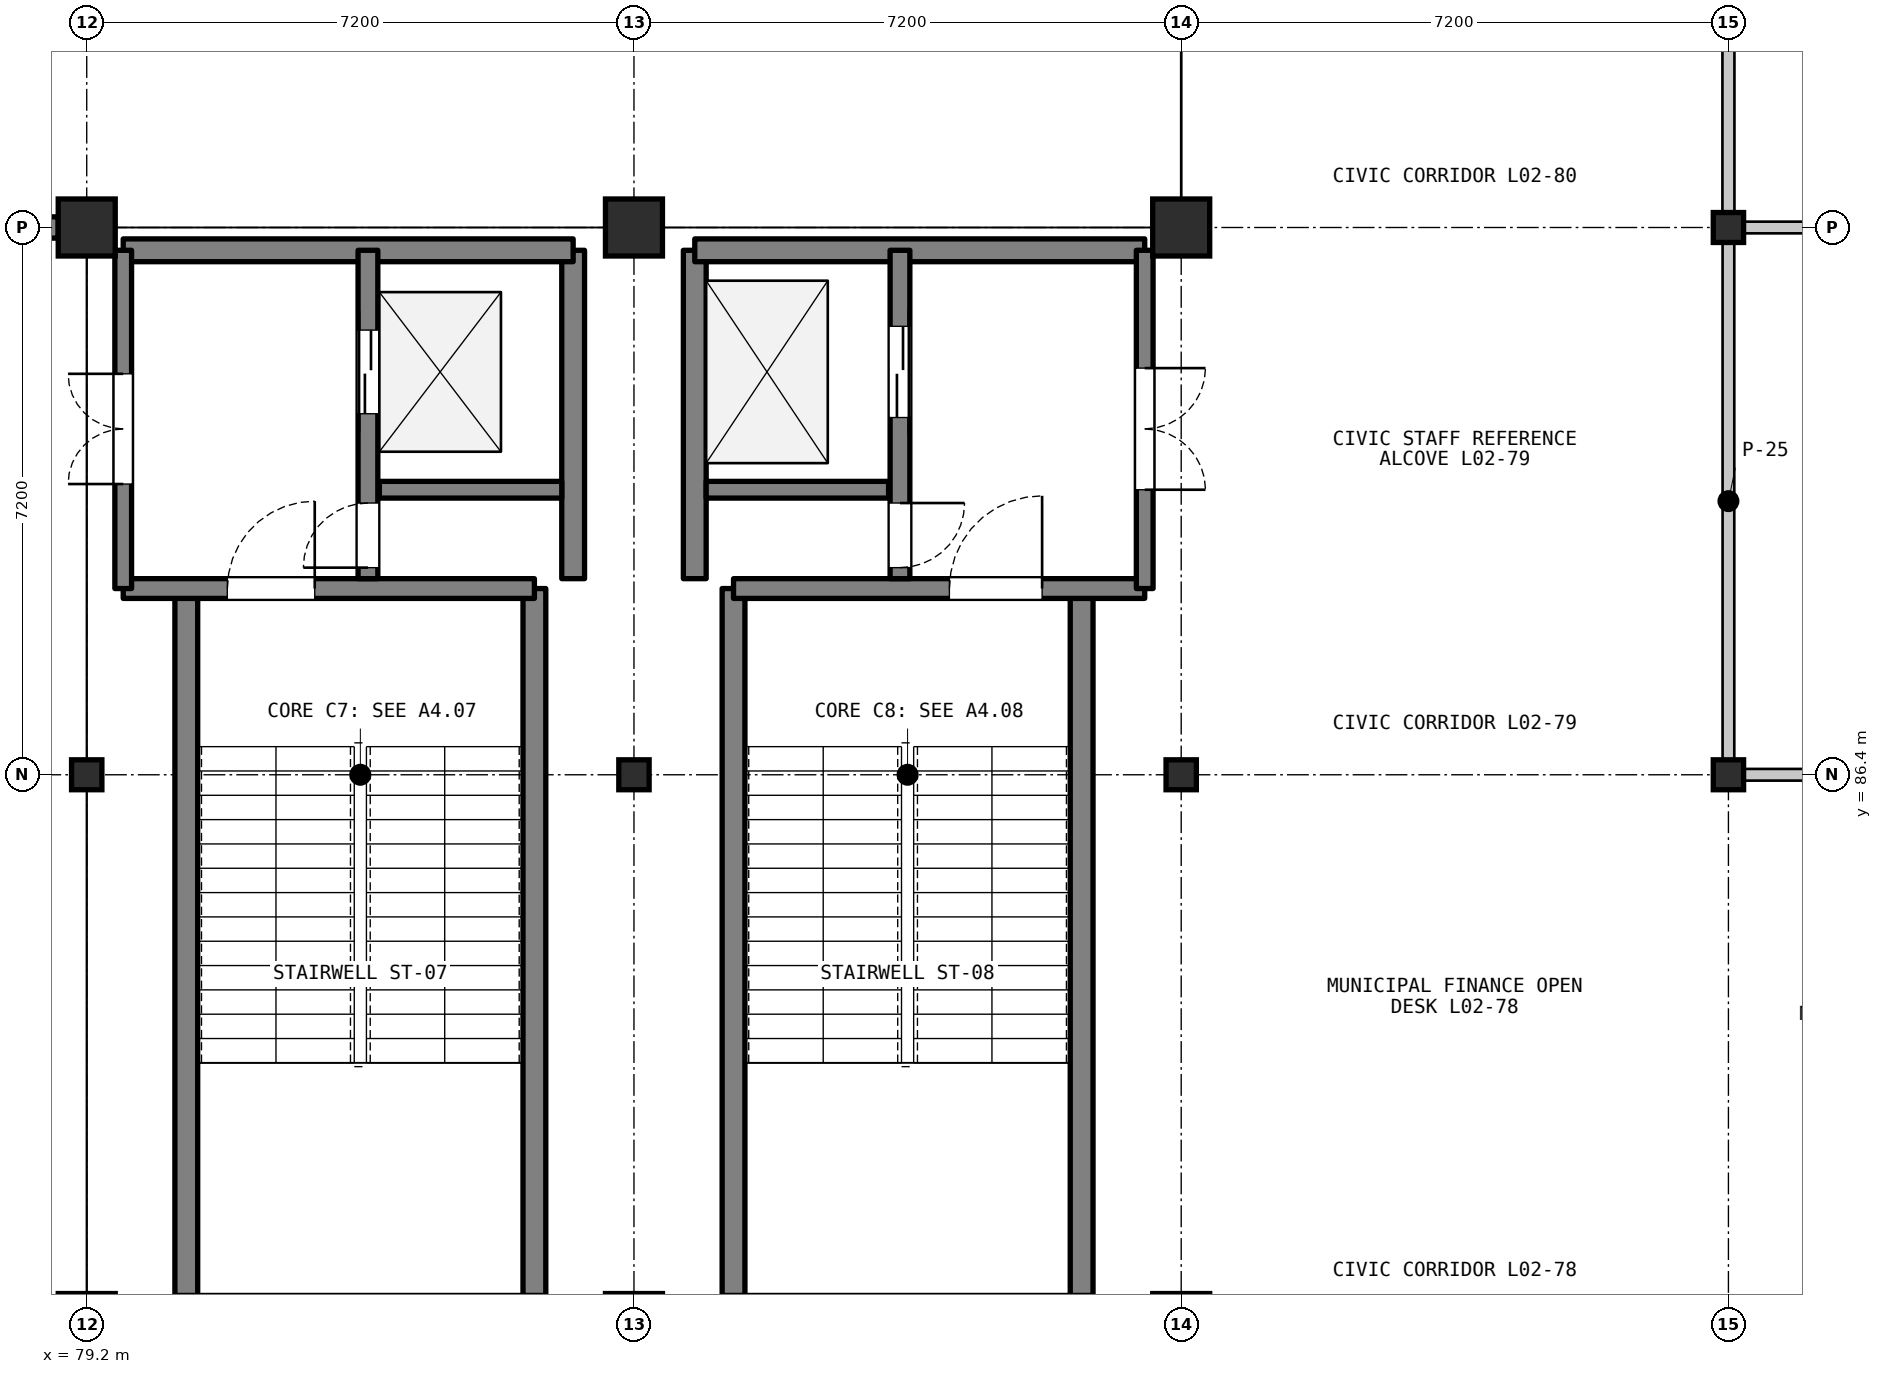
"""IFC4 building model, lengths in metres.
Left out: names, types, materials, properties, quantities, classifications, styles, units other than length and angle.
Written with IfcOpenShell. Run it as: python <this file> out.ifc"""

import sys

from ifc_helpers import new_model, si_unit, direction, frame, frame_2d, origin, origin_2d, place, context, subcontext, project, spatial, rectangle, i_section, extrude, element, fill, save


model = new_model("IFC4")
c1 = context("Model", 3, precision=1e-05, world=origin(), true_north=direction((0.0, 1.0)))
c2 = subcontext(c1, "Body", "Model", "MODEL_VIEW")
j1 = project(units=[si_unit("LENGTHUNIT", "METRE"), si_unit("PLANEANGLEUNIT", "RADIAN")], contexts=[c1])
p1 = place(None, origin())
s1 = spatial("IfcSite", under=j1, at=p1, CompositionType="ELEMENT")
p2 = place(p1, origin())
s2 = spatial("IfcBuilding", under=s1, at=p2, CompositionType="ELEMENT")
p3 = place(p2, frame((0.0, 0.0, 5.4)))
s3 = spatial("IfcBuildingStorey", under=s2, at=p3, CompositionType="ELEMENT", Elevation=5.4)
p4 = place(p3, frame((79.2, 79.2, 0.0), z_axis=(0.0, 0.0, 1.0), x_axis=(1.0, 0.0, 0.0)))
e1 = element("IfcColumn", 1, at=p4, inside=s3, PredefinedType="COLUMN", context=c2, shape_type="SweptSolid", body=[
    extrude(rectangle(XDim=0.75, YDim=0.75, at=origin_2d()), origin(), (0.0, 0.0, 1.0), 4.5),
])
p5 = place(p3, frame((79.2, 86.4, 0.0), z_axis=(0.0, 0.0, 1.0), x_axis=(1.0, 0.0, 0.0)))
e2 = element("IfcColumn", 2, at=p5, inside=s3, PredefinedType="COLUMN", context=c2, shape_type="SweptSolid", body=[
    extrude(i_section(OverallWidth=0.399, OverallDepth=0.394, WebThickness=0.023, FlangeThickness=0.037, FilletRadius=0.015, at=origin_2d()), origin(), (0.0, 0.0, 1.0), 4.5),
])
for number, where, z_axis, x_axis in (
    (3, (79.2, 93.6, 0.0), (0.0, 0.0, 1.0), (1.0, 0.0, 0.0)),
    (4, (86.4, 79.2, 0.0), (0.0, 0.0, 1.0), (1.0, 0.0, 0.0)),
):
    element("IfcColumn", number, at=place(p3, frame(where, z_axis=z_axis, x_axis=x_axis)), inside=s3, PredefinedType="COLUMN", context=c2, shape_type="SweptSolid", body=[
        extrude(rectangle(XDim=0.75, YDim=0.75, at=origin_2d()), origin(), (0.0, 0.0, 1.0), 4.5),
    ])
p6 = place(p3, frame((86.4, 86.4, 0.0), z_axis=(0.0, 0.0, 1.0), x_axis=(1.0, 0.0, 0.0)))
e5 = element("IfcColumn", 5, at=p6, inside=s3, PredefinedType="COLUMN", context=c2, shape_type="SweptSolid", body=[
    extrude(i_section(OverallWidth=0.399, OverallDepth=0.394, WebThickness=0.023, FlangeThickness=0.037, FilletRadius=0.015, at=origin_2d()), origin(), (0.0, 0.0, 1.0), 4.5),
])
for number, where, z_axis, x_axis in (
    (6, (86.4, 93.6, 0.0), (0.0, 0.0, 1.0), (1.0, 0.0, 0.0)),
    (7, (93.6, 79.2, 0.0), (0.0, 0.0, 1.0), (1.0, 0.0, 0.0)),
):
    element("IfcColumn", number, at=place(p3, frame(where, z_axis=z_axis, x_axis=x_axis)), inside=s3, PredefinedType="COLUMN", context=c2, shape_type="SweptSolid", body=[
        extrude(rectangle(XDim=0.75, YDim=0.75, at=origin_2d()), origin(), (0.0, 0.0, 1.0), 4.5),
    ])
p7 = place(p3, frame((93.6, 86.4, 0.0), z_axis=(0.0, 0.0, 1.0), x_axis=(1.0, 0.0, 0.0)))
e8 = element("IfcColumn", 8, at=p7, inside=s3, PredefinedType="COLUMN", context=c2, shape_type="SweptSolid", body=[
    extrude(i_section(OverallWidth=0.399, OverallDepth=0.394, WebThickness=0.023, FlangeThickness=0.037, FilletRadius=0.015, at=origin_2d()), origin(), (0.0, 0.0, 1.0), 4.5),
])
p8 = place(p3, frame((93.6, 93.6, 0.0), z_axis=(0.0, 0.0, 1.0), x_axis=(1.0, 0.0, 0.0)))
e9 = element("IfcColumn", 9, at=p8, inside=s3, PredefinedType="COLUMN", context=c2, shape_type="SweptSolid", body=[
    extrude(rectangle(XDim=0.75, YDim=0.75, at=origin_2d()), origin(), (0.0, 0.0, 1.0), 4.5),
])
for number, where, z_axis, x_axis in (
    (10, (100.8, 86.4, 0.0), (0.0, 0.0, 1.0), (1.0, 0.0, 0.0)),
    (11, (100.8, 93.6, 0.0), (0.0, 0.0, 1.0), (1.0, 0.0, 0.0)),
):
    element("IfcColumn", number, at=place(p3, frame(where, z_axis=z_axis, x_axis=x_axis)), inside=s3, PredefinedType="COLUMN", context=c2, shape_type="SweptSolid", body=[
        extrude(i_section(OverallWidth=0.399, OverallDepth=0.394, WebThickness=0.023, FlangeThickness=0.037, FilletRadius=0.015, at=origin_2d()), origin(), (0.0, 0.0, 1.0), 4.5),
    ])
p9 = place(p3, frame((72.375, 93.6, 0.0), z_axis=(0.0, 0.0, 1.0), x_axis=(1.0, 0.0, 0.0)))
e12 = element("IfcWall", 12, at=p9, inside=s3, PredefinedType="SOLIDWALL", context=c2, shape_type="SweptSolid", body=[
    extrude(rectangle(XDim=6.45, YDim=0.28, at=frame_2d((3.225, 0.0))), origin(), (0.0, 0.0, 1.0), 3.698),
])
for number, where, z_axis, x_axis in (
    (13, (80.51, 79.55, 0.0), (0.0, 0.0, 1.0), (0.0, 1.0, 0.0)),
    (14, (85.09, 79.55, 0.0), (0.0, 0.0, 1.0), (0.0, 1.0, 0.0)),
):
    element("IfcWall", number, at=place(p3, frame(where, z_axis=z_axis, x_axis=x_axis)), inside=s3, PredefinedType="SHEAR", context=c2, shape_type="SweptSolid", body=[
        extrude(rectangle(XDim=9.3, YDim=0.3, at=frame_2d((4.65, 0.0))), origin(), (0.0, 0.0, 1.0), 4.3),
    ])
p10 = place(p3, frame((79.68, 88.85, 0.0), z_axis=(0.0, 0.0, 1.0), x_axis=(1.0, 0.0, 0.0)))
e15 = element("IfcWall", 15, at=p10, inside=s3, PredefinedType="SHEAR", context=c2, shape_type="SweptSolid", body=[
    extrude(rectangle(XDim=5.41, YDim=0.26, at=frame_2d((2.705, 0.0))), origin(), (0.0, 0.0, 1.0), 4.3),
])
p11 = place(p10, frame((1.37, 0.0, 0.0)))
e16 = element("IfcOpeningElement", 16, at=p11, cuts=e15, PredefinedType="OPENING", context=c2, shape_type="SweptSolid", body=[
    extrude(rectangle(XDim=1.15, YDim=2.15, at=frame_2d((0.575, 1.075))), frame((0.0, 0.14, 0.0), z_axis=(0.0, -1.0, 0.0), x_axis=(1.0, 0.0, 0.0)), (0.0, 0.0, 1.0), 0.28),
])
p12 = place(p3, frame((85.6, 88.98, 0.0), z_axis=(0.0, 0.0, 1.0), x_axis=(0.0, 1.0, 0.0)))
e17 = element("IfcWall", 17, at=p12, inside=s3, PredefinedType="SHEAR", context=c2, shape_type="SweptSolid", body=[
    extrude(rectangle(XDim=4.32, YDim=0.3, at=frame_2d((2.16, 0.0))), origin(), (0.0, 0.0, 1.0), 4.3),
])
p13 = place(p3, frame((79.68, 93.3, 0.0), z_axis=(0.0, 0.0, 1.0), x_axis=(1.0, 0.0, 0.0)))
e18 = element("IfcWall", 18, at=p13, inside=s3, PredefinedType="SHEAR", context=c2, shape_type="SweptSolid", body=[
    extrude(rectangle(XDim=5.92, YDim=0.3, at=frame_2d((2.96, 0.0))), origin(), (0.0, 0.0, 1.0), 4.3),
])
p14 = place(p3, frame((83.05, 90.15, 0.0), z_axis=(0.0, 0.0, 1.0), x_axis=(1.0, 0.0, 0.0)))
e19 = element("IfcWall", 19, at=p14, inside=s3, PredefinedType="SHEAR", context=c2, shape_type="SweptSolid", body=[
    extrude(rectangle(XDim=2.4, YDim=0.22, at=frame_2d((1.2, 0.0))), origin(), (0.0, 0.0, 1.0), 4.3),
])
p15 = place(p3, frame((82.9, 88.98, 0.0), z_axis=(0.0, 0.0, 1.0), x_axis=(0.0, 1.0, 0.0)))
e20 = element("IfcWall", 20, at=p15, inside=s3, PredefinedType="SHEAR", context=c2, shape_type="SweptSolid", body=[
    extrude(rectangle(XDim=4.32, YDim=0.26, at=frame_2d((2.16, 0.0))), origin(), (0.0, 0.0, 1.0), 4.3),
])
p16 = place(p15, frame((2.17, 0.0, 0.0)))
e21 = element("IfcOpeningElement", 21, at=p16, cuts=e20, PredefinedType="OPENING", context=c2, shape_type="SweptSolid", body=[
    extrude(rectangle(XDim=1.1, YDim=2.15, at=frame_2d((0.55, 1.075))), frame((0.0, 0.14, 0.0), z_axis=(0.0, -1.0, 0.0), x_axis=(1.0, 0.0, 0.0)), (0.0, 0.0, 1.0), 0.28),
])
p17 = place(p15, frame((0.145, 0.0, 0.0)))
e22 = element("IfcOpeningElement", 22, at=p17, cuts=e20, PredefinedType="OPENING", context=c2, shape_type="SweptSolid", body=[
    extrude(rectangle(XDim=0.85, YDim=2.05, at=frame_2d((0.425, 1.025))), frame((0.0, 0.14, 0.0), z_axis=(0.0, -1.0, 0.0), x_axis=(1.0, 0.0, 0.0)), (0.0, 0.0, 1.0), 0.28),
])
p18 = place(p3, frame((79.68, 88.85, 0.0), z_axis=(0.0, 0.0, 1.0), x_axis=(0.0, 1.0, 0.0)))
e23 = element("IfcWall", 23, at=p18, inside=s3, PredefinedType="SHEAR", context=c2, shape_type="SweptSolid", body=[
    extrude(rectangle(XDim=4.45, YDim=0.22, at=frame_2d((2.225, 0.0))), origin(), (0.0, 0.0, 1.0), 4.3),
])
p19 = place(p18, frame((1.375, 0.0, 0.0)))
e24 = element("IfcOpeningElement", 24, at=p19, cuts=e23, PredefinedType="OPENING", context=c2, shape_type="SweptSolid", body=[
    extrude(rectangle(XDim=1.45, YDim=2.2, at=frame_2d((0.725, 1.1))), frame((0.0, 0.12, 0.0), z_axis=(0.0, -1.0, 0.0), x_axis=(1.0, 0.0, 0.0)), (0.0, 0.0, 1.0), 0.24),
])
for number, where, z_axis, x_axis in (
    (25, (87.71, 79.55, 0.0), (0.0, 0.0, 1.0), (0.0, 1.0, 0.0)),
    (26, (92.29, 79.55, 0.0), (0.0, 0.0, 1.0), (0.0, 1.0, 0.0)),
):
    element("IfcWall", number, at=place(p3, frame(where, z_axis=z_axis, x_axis=x_axis)), inside=s3, PredefinedType="SHEAR", context=c2, shape_type="SweptSolid", body=[
        extrude(rectangle(XDim=9.3, YDim=0.3, at=frame_2d((4.65, 0.0))), origin(), (0.0, 0.0, 1.0), 4.3),
    ])
p20 = place(p3, frame((87.71, 88.85, 0.0), z_axis=(0.0, 0.0, 1.0), x_axis=(1.0, 0.0, 0.0)))
e27 = element("IfcWall", 27, at=p20, inside=s3, PredefinedType="SHEAR", context=c2, shape_type="SweptSolid", body=[
    extrude(rectangle(XDim=5.41, YDim=0.26, at=frame_2d((2.705, 0.0))), origin(), (0.0, 0.0, 1.0), 4.3),
])
p21 = place(p20, frame((2.84, 0.0, 0.0)))
e28 = element("IfcOpeningElement", 28, at=p21, cuts=e27, PredefinedType="OPENING", context=c2, shape_type="SweptSolid", body=[
    extrude(rectangle(XDim=1.22, YDim=2.15, at=frame_2d((0.61, 1.075))), frame((0.0, 0.14, 0.0), z_axis=(0.0, -1.0, 0.0), x_axis=(1.0, 0.0, 0.0)), (0.0, 0.0, 1.0), 0.28),
])
p22 = place(p3, frame((87.2, 88.98, 0.0), z_axis=(0.0, 0.0, 1.0), x_axis=(0.0, 1.0, 0.0)))
e29 = element("IfcWall", 29, at=p22, inside=s3, PredefinedType="SHEAR", context=c2, shape_type="SweptSolid", body=[
    extrude(rectangle(XDim=4.32, YDim=0.3, at=frame_2d((2.16, 0.0))), origin(), (0.0, 0.0, 1.0), 4.3),
])
p23 = place(p3, frame((87.2, 93.3, 0.0), z_axis=(0.0, 0.0, 1.0), x_axis=(1.0, 0.0, 0.0)))
e30 = element("IfcWall", 30, at=p23, inside=s3, PredefinedType="SHEAR", context=c2, shape_type="SweptSolid", body=[
    extrude(rectangle(XDim=5.92, YDim=0.3, at=frame_2d((2.96, 0.0))), origin(), (0.0, 0.0, 1.0), 4.3),
])
p24 = place(p3, frame((87.35, 90.15, 0.0), z_axis=(0.0, 0.0, 1.0), x_axis=(1.0, 0.0, 0.0)))
e31 = element("IfcWall", 31, at=p24, inside=s3, PredefinedType="SHEAR", context=c2, shape_type="SweptSolid", body=[
    extrude(rectangle(XDim=2.4, YDim=0.22, at=frame_2d((1.2, 0.0))), origin(), (0.0, 0.0, 1.0), 4.3),
])
p25 = place(p3, frame((89.9, 93.3, 0.0), z_axis=(0.0, 0.0, 1.0), x_axis=(0.0, -1.0, 0.0)))
e32 = element("IfcWall", 32, at=p25, inside=s3, PredefinedType="SHEAR", context=c2, shape_type="SweptSolid", body=[
    extrude(rectangle(XDim=4.32, YDim=0.26, at=frame_2d((2.16, 0.0))), origin(), (0.0, 0.0, 1.0), 4.3),
])
p26 = place(p25, frame((1.0, 0.0, 0.0)))
e33 = element("IfcOpeningElement", 33, at=p26, cuts=e32, PredefinedType="OPENING", context=c2, shape_type="SweptSolid", body=[
    extrude(rectangle(XDim=1.2, YDim=2.15, at=frame_2d((0.6, 1.075))), frame((0.0, 0.14, 0.0), z_axis=(0.0, -1.0, 0.0), x_axis=(1.0, 0.0, 0.0)), (0.0, 0.0, 1.0), 0.28),
])
p27 = place(p25, frame((3.325, 0.0, 0.0)))
e34 = element("IfcOpeningElement", 34, at=p27, cuts=e32, PredefinedType="OPENING", context=c2, shape_type="SweptSolid", body=[
    extrude(rectangle(XDim=0.85, YDim=2.05, at=frame_2d((0.425, 1.025))), frame((0.0, 0.14, 0.0), z_axis=(0.0, -1.0, 0.0), x_axis=(1.0, 0.0, 0.0)), (0.0, 0.0, 1.0), 0.28),
])
p28 = place(p3, frame((93.12, 93.3, 0.0), z_axis=(0.0, 0.0, 1.0), x_axis=(0.0, -1.0, 0.0)))
e35 = element("IfcWall", 35, at=p28, inside=s3, PredefinedType="SHEAR", context=c2, shape_type="SweptSolid", body=[
    extrude(rectangle(XDim=4.45, YDim=0.22, at=frame_2d((2.225, 0.0))), origin(), (0.0, 0.0, 1.0), 4.3),
])
p29 = place(p28, frame((1.55, 0.0, 0.0)))
e36 = element("IfcOpeningElement", 36, at=p29, cuts=e35, PredefinedType="OPENING", context=c2, shape_type="SweptSolid", body=[
    extrude(rectangle(XDim=1.6, YDim=2.2, at=frame_2d((0.8, 1.1))), frame((0.0, 0.12, 0.0), z_axis=(0.0, -1.0, 0.0), x_axis=(1.0, 0.0, 0.0)), (0.0, 0.0, 1.0), 0.24),
])
p30 = place(p3, frame((107.88, 86.4, 0.0), z_axis=(0.0, 0.0, 1.0), x_axis=(-1.0, 0.0, 0.0)))
e37 = element("IfcWall", 37, at=p30, inside=s3, PredefinedType="PARTITIONING", context=c2, shape_type="SweptSolid", body=[
    extrude(rectangle(XDim=6.96, YDim=0.154, at=frame_2d((3.48, 0.0))), origin(), (0.0, 0.0, 1.0), 3.688),
])
p31 = place(p30, frame((2.74, 0.0, 0.0)))
e38 = element("IfcOpeningElement", 38, at=p31, cuts=e37, PredefinedType="OPENING", context=c2, shape_type="SweptSolid", body=[
    extrude(rectangle(XDim=1.48, YDim=2.25, at=frame_2d((0.74, 1.125))), frame((0.0, 0.087, 0.0), z_axis=(0.0, -1.0, 0.0), x_axis=(1.0, 0.0, 0.0)), (0.0, 0.0, 1.0), 0.174),
])
p32 = place(p30, frame((0.45, 0.0, 1.05)))
e39 = element("IfcOpeningElement", 39, at=p32, cuts=e37, PredefinedType="OPENING", context=c2, shape_type="SweptSolid", body=[
    extrude(rectangle(XDim=1.95, YDim=1.22, at=frame_2d((0.975, 0.61))), frame((0.0, 0.087, 0.0), z_axis=(0.0, -1.0, 0.0), x_axis=(1.0, 0.0, 0.0)), (0.0, 0.0, 1.0), 0.174),
])
for number, where, z_axis, x_axis in (
    (40, (100.92, 93.6, 0.0), (0.0, 0.0, 1.0), (1.0, 0.0, 0.0)),
    (41, (100.8, 86.52, 0.0), (0.0, 0.0, 1.0), (0.0, 1.0, 0.0)),
):
    element("IfcWall", number, at=place(p3, frame(where, z_axis=z_axis, x_axis=x_axis)), inside=s3, PredefinedType="PARTITIONING", context=c2, shape_type="SweptSolid", body=[
        extrude(rectangle(XDim=6.96, YDim=0.154, at=frame_2d((3.48, 0.0))), origin(), (0.0, 0.0, 1.0), 3.688),
    ])
p33 = place(p3, frame((100.8, 93.72, 0.0), z_axis=(0.0, 0.0, 1.0), x_axis=(0.0, 1.0, 0.0)))
e42 = element("IfcWall", 42, at=p33, inside=s3, PredefinedType="PARTITIONING", context=c2, shape_type="SweptSolid", body=[
    extrude(rectangle(XDim=6.96, YDim=0.158, at=frame_2d((3.48, 0.0))), origin(), (0.0, 0.0, 1.0), 3.688),
])
p34 = place(p11, origin())
e43 = element("IfcDoor", 43, at=p34, inside=s3, OperationType="SINGLE_SWING_RIGHT", PredefinedType="DOOR", context=c2, shape_type="SweptSolid", body=[
    extrude(rectangle(XDim=1.15, YDim=2.15, at=frame_2d((0.575, 1.075))), frame((0.0, 0.025, 0.0), z_axis=(0.0, -1.0, 0.0), x_axis=(1.0, 0.0, 0.0)), (0.0, 0.0, 1.0), 0.05),
])
fill(e16, e43)
p35 = place(p16, origin())
e44 = element("IfcDoor", 44, at=p35, inside=s3, OperationType="DOUBLE_DOOR_SLIDING", PredefinedType="DOOR", context=c2, shape_type="SweptSolid", body=[
    extrude(rectangle(XDim=1.1, YDim=2.15, at=frame_2d((0.55, 1.075))), frame((0.0, 0.025, 0.0), z_axis=(0.0, -1.0, 0.0), x_axis=(1.0, 0.0, 0.0)), (0.0, 0.0, 1.0), 0.05),
])
fill(e21, e44)
p36 = place(p17, origin())
e45 = element("IfcDoor", 45, at=p36, inside=s3, OperationType="SINGLE_SWING_LEFT", PredefinedType="DOOR", context=c2, shape_type="SweptSolid", body=[
    extrude(rectangle(XDim=0.85, YDim=2.05, at=frame_2d((0.425, 1.025))), frame((0.0, 0.025, 0.0), z_axis=(0.0, -1.0, 0.0), x_axis=(1.0, 0.0, 0.0)), (0.0, 0.0, 1.0), 0.05),
])
fill(e22, e45)
p37 = place(p19, origin())
e46 = element("IfcDoor", 46, at=p37, inside=s3, OperationType="DOUBLE_DOOR_SINGLE_SWING", PredefinedType="DOOR", context=c2, shape_type="SweptSolid", body=[
    extrude(rectangle(XDim=1.45, YDim=2.2, at=frame_2d((0.725, 1.1))), frame((0.0, 0.025, 0.0), z_axis=(0.0, -1.0, 0.0), x_axis=(1.0, 0.0, 0.0)), (0.0, 0.0, 1.0), 0.05),
])
fill(e24, e46)
p38 = place(p21, origin())
e47 = element("IfcDoor", 47, at=p38, inside=s3, OperationType="SINGLE_SWING_RIGHT", PredefinedType="DOOR", context=c2, shape_type="SweptSolid", body=[
    extrude(rectangle(XDim=1.22, YDim=2.15, at=frame_2d((0.61, 1.075))), frame((0.0, 0.025, 0.0), z_axis=(0.0, -1.0, 0.0), x_axis=(1.0, 0.0, 0.0)), (0.0, 0.0, 1.0), 0.05),
])
fill(e28, e47)
p39 = place(p26, origin())
e48 = element("IfcDoor", 48, at=p39, inside=s3, OperationType="DOUBLE_DOOR_SLIDING", PredefinedType="DOOR", context=c2, shape_type="SweptSolid", body=[
    extrude(rectangle(XDim=1.2, YDim=2.15, at=frame_2d((0.6, 1.075))), frame((0.0, 0.025, 0.0), z_axis=(0.0, -1.0, 0.0), x_axis=(1.0, 0.0, 0.0)), (0.0, 0.0, 1.0), 0.05),
])
fill(e33, e48)
p40 = place(p27, origin())
e49 = element("IfcDoor", 49, at=p40, inside=s3, OperationType="SINGLE_SWING_LEFT", PredefinedType="DOOR", context=c2, shape_type="SweptSolid", body=[
    extrude(rectangle(XDim=0.85, YDim=2.05, at=frame_2d((0.425, 1.025))), frame((0.0, 0.025, 0.0), z_axis=(0.0, -1.0, 0.0), x_axis=(1.0, 0.0, 0.0)), (0.0, 0.0, 1.0), 0.05),
])
fill(e34, e49)
p41 = place(p29, origin())
e50 = element("IfcDoor", 50, at=p41, inside=s3, OperationType="DOUBLE_DOOR_SINGLE_SWING", PredefinedType="DOOR", context=c2, shape_type="SweptSolid", body=[
    extrude(rectangle(XDim=1.6, YDim=2.2, at=frame_2d((0.8, 1.1))), frame((0.0, 0.025, 0.0), z_axis=(0.0, -1.0, 0.0), x_axis=(1.0, 0.0, 0.0)), (0.0, 0.0, 1.0), 0.05),
])
fill(e36, e50)
save(model, sys.argv[1])
